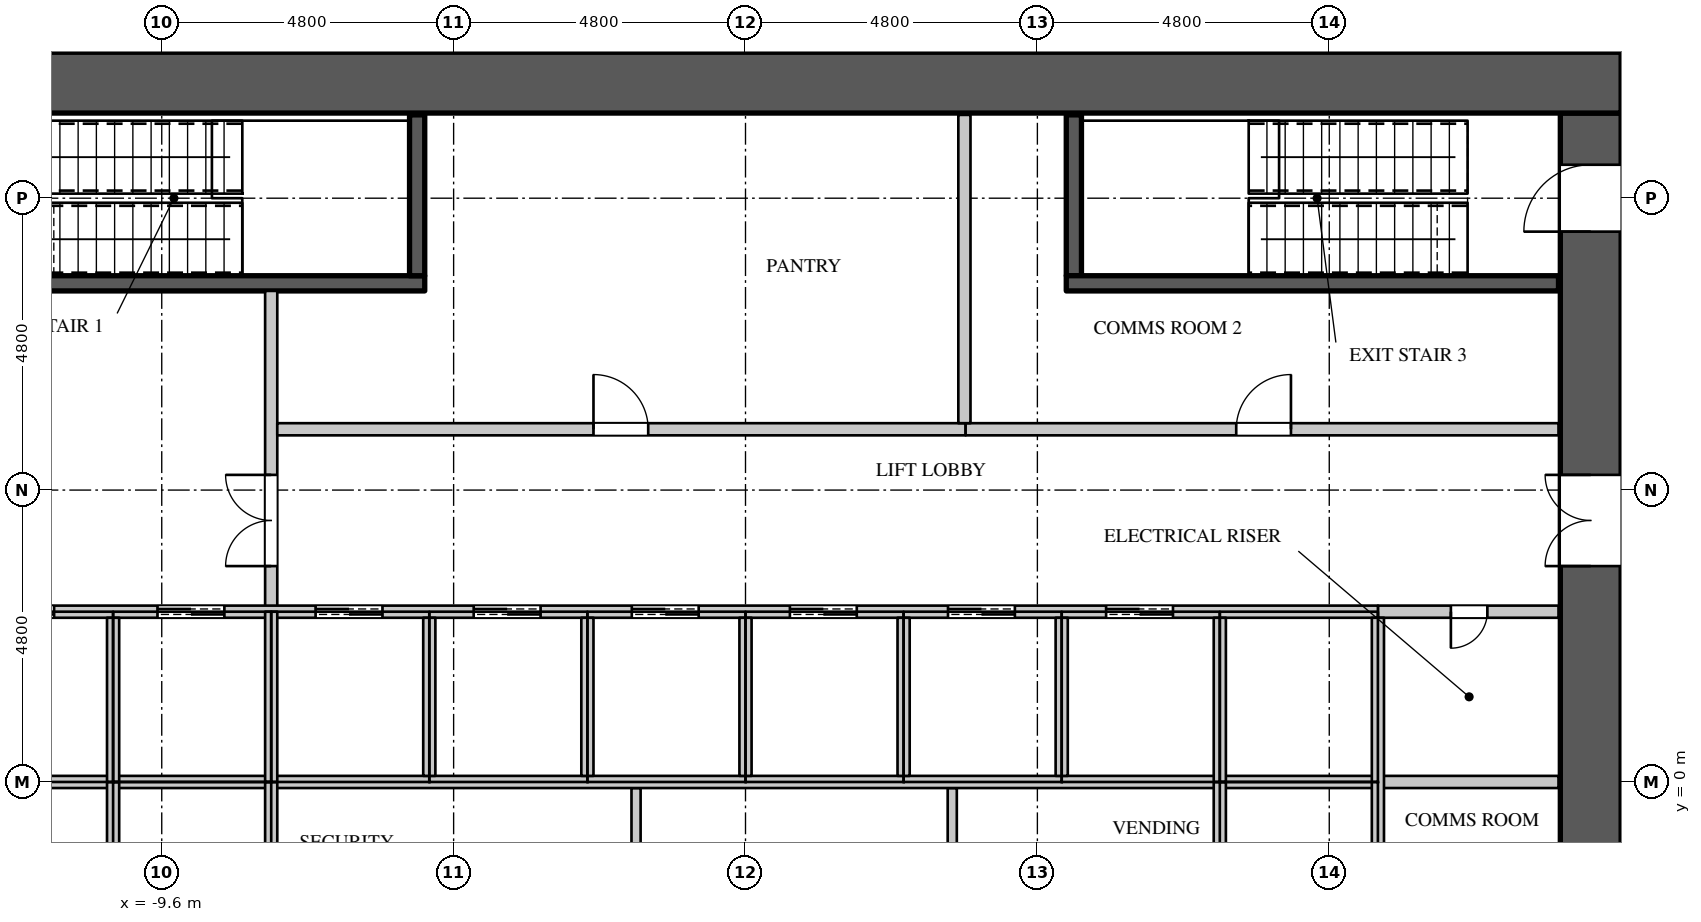
"""IFC4 building model, lengths in metres.
Left out: names, types, materials, properties, quantities, classifications, styles, units other than length and angle.
Written with IfcOpenShell. Run it as: python <this file> out.ifc"""

import sys

from ifc_helpers import new_model, si_unit, direction, frame, frame_2d, origin, place, context, subcontext, project, spatial, rectangle, extrude, element, fill, save


model = new_model("IFC4")
c1 = context("Model", 3, precision=1e-05, world=origin(), true_north=direction((0.0, 1.0)))
c2 = subcontext(c1, "Body", "Model", "MODEL_VIEW")
j1 = project(units=[si_unit("LENGTHUNIT", "METRE"), si_unit("PLANEANGLEUNIT", "RADIAN")], contexts=[c1])
p1 = place(None, origin())
s1 = spatial("IfcSite", under=j1, at=p1, CompositionType="ELEMENT")
p2 = place(p1, origin())
s2 = spatial("IfcBuilding", under=s1, at=p2, CompositionType="ELEMENT")
p3 = place(p2, frame((0.0, 0.0, 50.7)))
s3 = spatial("IfcBuildingStorey", under=s2, at=p3, CompositionType="ELEMENT", Elevation=50.7)
p4 = place(p3, frame((-14.4, 11.5, 0.0), z_axis=(0.0, 0.0, 1.0), x_axis=(1.0, 0.0, 0.0)))
e1 = element("IfcWall", 1, at=p4, inside=s3, PredefinedType="SHEAR", context=c2, shape_type="SweptSolid", body=[
    extrude(rectangle(XDim=28.8, YDim=1.0, at=frame_2d((14.4, 0.0))), origin(), (0.0, 0.0, 1.0), 4.2),
])
p5 = place(p3, frame((13.9, -11.0, 0.0), z_axis=(0.0, 0.0, 1.0), x_axis=(0.0, 1.0, 0.0)))
e2 = element("IfcWall", 2, at=p5, inside=s3, PredefinedType="SHEAR", context=c2, shape_type="SweptSolid", body=[
    extrude(rectangle(XDim=22.0, YDim=1.0, at=frame_2d((11.0, 0.0))), origin(), (0.0, 0.0, 1.0), 4.2),
])
p6 = place(p5, frame((20.05, 0.0, 0.0)))
e3 = element("IfcOpeningElement", 3, at=p6, cuts=e2, PredefinedType="OPENING", context=c2, shape_type="SweptSolid", body=[
    extrude(rectangle(XDim=1.1, YDim=2.2, at=frame_2d((0.55, 1.1))), frame((0.0, 0.51, 0.0), z_axis=(0.0, -1.0, 0.0), x_axis=(1.0, 0.0, 0.0)), (0.0, 0.0, 1.0), 1.02),
])
p7 = place(p5, frame((0.85, 0.0, 0.0)))
e4 = element("IfcOpeningElement", 4, at=p7, cuts=e2, PredefinedType="OPENING", context=c2, shape_type="SweptSolid", body=[
    extrude(rectangle(XDim=1.1, YDim=2.2, at=frame_2d((0.55, 1.1))), frame((0.0, 0.51, 0.0), z_axis=(0.0, -1.0, 0.0), x_axis=(1.0, 0.0, 0.0)), (0.0, 0.0, 1.0), 1.02),
])
p8 = place(p5, frame((14.55, 0.0, 0.0)))
e5 = element("IfcOpeningElement", 5, at=p8, cuts=e2, PredefinedType="OPENING", context=c2, shape_type="SweptSolid", body=[
    extrude(rectangle(XDim=1.5, YDim=2.4, at=frame_2d((0.75, 1.2))), frame((0.0, 0.51, 0.0), z_axis=(0.0, -1.0, 0.0), x_axis=(1.0, 0.0, 0.0)), (0.0, 0.0, 1.0), 1.02),
])
p9 = place(p5, frame((5.95, 0.0, 0.0)))
e6 = element("IfcOpeningElement", 6, at=p9, cuts=e2, PredefinedType="OPENING", context=c2, shape_type="SweptSolid", body=[
    extrude(rectangle(XDim=1.5, YDim=2.4, at=frame_2d((0.75, 1.2))), frame((0.0, 0.51, 0.0), z_axis=(0.0, -1.0, 0.0), x_axis=(1.0, 0.0, 0.0)), (0.0, 0.0, 1.0), 1.02),
])
p10 = place(p3, frame((-7.8, 2.8, 0.0), z_axis=(0.0, 0.0, 1.0), x_axis=(0.0, 1.0, 0.0)))
e7 = element("IfcWall", 7, at=p10, inside=s3, PredefinedType="PARTITIONING", context=c2, shape_type="SweptSolid", body=[
    extrude(rectangle(XDim=5.275, YDim=0.2, at=frame_2d((2.637, 0.0))), origin(), (0.0, 0.0, 1.0), 3.95),
])
p11 = place(p10, frame((0.75, 0.0, 0.0)))
e8 = element("IfcOpeningElement", 8, at=p11, cuts=e7, PredefinedType="OPENING", context=c2, shape_type="SweptSolid", body=[
    extrude(rectangle(XDim=1.5, YDim=2.4, at=frame_2d((0.75, 1.2))), frame((0.0, 0.11, 0.0), z_axis=(0.0, -1.0, 0.0), x_axis=(1.0, 0.0, 0.0)), (0.0, 0.0, 1.0), 0.22),
])
p12 = place(p3, frame((-7.7, 5.8, 0.0), z_axis=(0.0, 0.0, 1.0), x_axis=(1.0, 0.0, 0.0)))
e9 = element("IfcWall", 9, at=p12, inside=s3, PredefinedType="PARTITIONING", context=c2, shape_type="SweptSolid", body=[
    extrude(rectangle(XDim=11.32, YDim=0.2, at=frame_2d((5.66, 0.0))), origin(), (0.0, 0.0, 1.0), 3.95),
])
p13 = place(p12, frame((5.2, 0.0, 0.0)))
e10 = element("IfcOpeningElement", 10, at=p13, cuts=e9, PredefinedType="OPENING", context=c2, shape_type="SweptSolid", body=[
    extrude(rectangle(XDim=0.9, YDim=2.2, at=frame_2d((0.45, 1.1))), frame((0.0, 0.11, 0.0), z_axis=(0.0, -1.0, 0.0), x_axis=(1.0, 0.0, 0.0)), (0.0, 0.0, 1.0), 0.22),
])
for number, where, z_axis, x_axis in (
    (11, (-1.8, -2.7, 0.0), (0.0, 0.0, 1.0), (0.0, 1.0, 0.0)),
    (12, (3.4, -2.7, 0.0), (0.0, 0.0, 1.0), (0.0, 1.0, 0.0)),
):
    element("IfcWall", number, at=place(p3, frame(where, z_axis=z_axis, x_axis=x_axis)), inside=s3, PredefinedType="PARTITIONING", context=c2, shape_type="SweptSolid", body=[
        extrude(rectangle(XDim=2.6, YDim=0.15, at=frame_2d((1.3, 0.0))), origin(), (0.0, 0.0, 1.0), 3.95),
    ])
p14 = place(p3, frame((3.62, 5.8, 0.0), z_axis=(0.0, 0.0, 1.0), x_axis=(1.0, 0.0, 0.0)))
e13 = element("IfcWall", 13, at=p14, inside=s3, PredefinedType="PARTITIONING", context=c2, shape_type="SweptSolid", body=[
    extrude(rectangle(XDim=9.75, YDim=0.2, at=frame_2d((4.875, 0.0))), origin(), (0.0, 0.0, 1.0), 3.95),
])
p15 = place(p14, frame((4.45, 0.0, 0.0)))
e14 = element("IfcOpeningElement", 14, at=p15, cuts=e13, PredefinedType="OPENING", context=c2, shape_type="SweptSolid", body=[
    extrude(rectangle(XDim=0.9, YDim=2.2, at=frame_2d((0.45, 1.1))), frame((0.0, 0.11, 0.0), z_axis=(0.0, -1.0, 0.0), x_axis=(1.0, 0.0, 0.0)), (0.0, 0.0, 1.0), 0.22),
])
p16 = place(p3, frame((3.6, 5.9, 0.0), z_axis=(0.0, 0.0, 1.0), x_axis=(0.0, 1.0, 0.0)))
e15 = element("IfcWall", 15, at=p16, inside=s3, PredefinedType="PARTITIONING", context=c2, shape_type="SweptSolid", body=[
    extrude(rectangle(XDim=5.07, YDim=0.2, at=frame_2d((2.535, 0.0))), origin(), (0.0, 0.0, 1.0), 3.95),
])
p17 = place(p3, frame((10.4, 2.8, 0.0), z_axis=(0.0, 0.0, 1.0), x_axis=(1.0, 0.0, 0.0)))
e16 = element("IfcWall", 16, at=p17, inside=s3, PredefinedType="PARTITIONING", context=c2, shape_type="SweptSolid", body=[
    extrude(rectangle(XDim=2.97, YDim=0.2, at=frame_2d((1.485, 0.0))), origin(), (0.0, 0.0, 1.0), 3.95),
])
p18 = place(p17, frame((1.2, 0.0, 0.0)))
e17 = element("IfcOpeningElement", 17, at=p18, cuts=e16, PredefinedType="OPENING", context=c2, shape_type="SweptSolid", body=[
    extrude(rectangle(XDim=0.6, YDim=2.0, at=frame_2d((0.3, 1.0))), frame((0.0, 0.11, 0.0), z_axis=(0.0, -1.0, 0.0), x_axis=(1.0, 0.0, 0.0)), (0.0, 0.0, 1.0), 0.22),
])
p19 = place(p3, frame((10.4, 0.0, 0.0), z_axis=(0.0, 0.0, 1.0), x_axis=(1.0, 0.0, 0.0)))
e18 = element("IfcWall", 18, at=p19, inside=s3, PredefinedType="PARTITIONING", context=c2, shape_type="SweptSolid", body=[
    extrude(rectangle(XDim=2.97, YDim=0.2, at=frame_2d((1.485, 0.0))), origin(), (0.0, 0.0, 1.0), 3.95),
])
p20 = place(p3, frame((-13.37, 0.0, 0.0), z_axis=(0.0, 0.0, 1.0), x_axis=(1.0, 0.0, 0.0)))
e19 = element("IfcWall", 19, at=p20, inside=s3, PredefinedType="PARTITIONING", context=c2, shape_type="SweptSolid", body=[
    extrude(rectangle(XDim=23.77, YDim=0.2, at=frame_2d((11.885, 0.0))), origin(), (0.0, 0.0, 1.0), 3.95),
])
p21 = place(p3, frame((-13.37, 2.8, 0.0), z_axis=(0.0, 0.0, 1.0), x_axis=(1.0, 0.0, 0.0)))
e20 = element("IfcWall", 20, at=p21, inside=s3, PredefinedType="PARTITIONING", context=c2, shape_type="SweptSolid", body=[
    extrude(rectangle(XDim=23.77, YDim=0.2, at=frame_2d((11.885, 0.0))), origin(), (0.0, 0.0, 1.0), 3.95),
])
p22 = place(p21, frame((0.9, 0.0, 0.0)))
e21 = element("IfcOpeningElement", 21, at=p22, cuts=e20, PredefinedType="OPENING", context=c2, shape_type="SweptSolid", body=[
    extrude(rectangle(XDim=1.1, YDim=2.2, at=frame_2d((0.55, 1.1))), frame((0.0, 0.11, 0.0), z_axis=(0.0, -1.0, 0.0), x_axis=(1.0, 0.0, 0.0)), (0.0, 0.0, 1.0), 0.22),
])
p23 = place(p21, frame((3.7, 0.0, 0.0)))
e22 = element("IfcOpeningElement", 22, at=p23, cuts=e20, PredefinedType="OPENING", context=c2, shape_type="SweptSolid", body=[
    extrude(rectangle(XDim=1.1, YDim=2.2, at=frame_2d((0.55, 1.1))), frame((0.0, 0.11, 0.0), z_axis=(0.0, -1.0, 0.0), x_axis=(1.0, 0.0, 0.0)), (0.0, 0.0, 1.0), 0.22),
])
p24 = place(p21, frame((6.3, 0.0, 0.0)))
e23 = element("IfcOpeningElement", 23, at=p24, cuts=e20, PredefinedType="OPENING", context=c2, shape_type="SweptSolid", body=[
    extrude(rectangle(XDim=1.1, YDim=2.2, at=frame_2d((0.55, 1.1))), frame((0.0, 0.11, 0.0), z_axis=(0.0, -1.0, 0.0), x_axis=(1.0, 0.0, 0.0)), (0.0, 0.0, 1.0), 0.22),
])
p25 = place(p21, frame((8.9, 0.0, 0.0)))
e24 = element("IfcOpeningElement", 24, at=p25, cuts=e20, PredefinedType="OPENING", context=c2, shape_type="SweptSolid", body=[
    extrude(rectangle(XDim=1.1, YDim=2.2, at=frame_2d((0.55, 1.1))), frame((0.0, 0.11, 0.0), z_axis=(0.0, -1.0, 0.0), x_axis=(1.0, 0.0, 0.0)), (0.0, 0.0, 1.0), 0.22),
])
p26 = place(p21, frame((11.5, 0.0, 0.0)))
e25 = element("IfcOpeningElement", 25, at=p26, cuts=e20, PredefinedType="OPENING", context=c2, shape_type="SweptSolid", body=[
    extrude(rectangle(XDim=1.1, YDim=2.2, at=frame_2d((0.55, 1.1))), frame((0.0, 0.11, 0.0), z_axis=(0.0, -1.0, 0.0), x_axis=(1.0, 0.0, 0.0)), (0.0, 0.0, 1.0), 0.22),
])
p27 = place(p21, frame((14.1, 0.0, 0.0)))
e26 = element("IfcOpeningElement", 26, at=p27, cuts=e20, PredefinedType="OPENING", context=c2, shape_type="SweptSolid", body=[
    extrude(rectangle(XDim=1.1, YDim=2.2, at=frame_2d((0.55, 1.1))), frame((0.0, 0.11, 0.0), z_axis=(0.0, -1.0, 0.0), x_axis=(1.0, 0.0, 0.0)), (0.0, 0.0, 1.0), 0.22),
])
p28 = place(p21, frame((16.7, 0.0, 0.0)))
e27 = element("IfcOpeningElement", 27, at=p28, cuts=e20, PredefinedType="OPENING", context=c2, shape_type="SweptSolid", body=[
    extrude(rectangle(XDim=1.1, YDim=2.2, at=frame_2d((0.55, 1.1))), frame((0.0, 0.11, 0.0), z_axis=(0.0, -1.0, 0.0), x_axis=(1.0, 0.0, 0.0)), (0.0, 0.0, 1.0), 0.22),
])
p29 = place(p21, frame((19.3, 0.0, 0.0)))
e28 = element("IfcOpeningElement", 28, at=p29, cuts=e20, PredefinedType="OPENING", context=c2, shape_type="SweptSolid", body=[
    extrude(rectangle(XDim=1.1, YDim=2.2, at=frame_2d((0.55, 1.1))), frame((0.0, 0.11, 0.0), z_axis=(0.0, -1.0, 0.0), x_axis=(1.0, 0.0, 0.0)), (0.0, 0.0, 1.0), 0.22),
])
for number, where, z_axis, x_axis in (
    (29, (-10.4, -2.7, 0.0), (0.0, 0.0, 1.0), (0.0, 1.0, 0.0)),
    (30, (-10.4, 0.0, 0.0), (0.0, 0.0, 1.0), (0.0, 1.0, 0.0)),
):
    element("IfcWall", number, at=place(p3, frame(where, z_axis=z_axis, x_axis=x_axis)), inside=s3, PredefinedType="PARTITIONING", context=c2, shape_type="SweptSolid", body=[
        extrude(rectangle(XDim=2.7, YDim=0.2, at=frame_2d((1.35, 0.0))), origin(), (0.0, 0.0, 1.0), 3.95),
    ])
for number, where, z_axis, x_axis in (
    (31, (-7.8, -2.8, 0.0), (0.0, 0.0, 1.0), (0.0, 1.0, 0.0)),
    (32, (-7.8, 0.0, 0.0), (0.0, 0.0, 1.0), (0.0, 1.0, 0.0)),
):
    element("IfcWall", number, at=place(p3, frame(where, z_axis=z_axis, x_axis=x_axis)), inside=s3, PredefinedType="PARTITIONING", context=c2, shape_type="SweptSolid", body=[
        extrude(rectangle(XDim=2.8, YDim=0.2, at=frame_2d((1.4, 0.0))), origin(), (0.0, 0.0, 1.0), 3.95),
    ])
for number, where, z_axis, x_axis in (
    (33, (-5.2, 0.1, 0.0), (0.0, 0.0, 1.0), (0.0, 1.0, 0.0)),
    (34, (-2.6, 0.1, 0.0), (0.0, 0.0, 1.0), (0.0, 1.0, 0.0)),
    (35, (0.0, 0.1, 0.0), (0.0, 0.0, 1.0), (0.0, 1.0, 0.0)),
    (36, (2.6, 0.1, 0.0), (0.0, 0.0, 1.0), (0.0, 1.0, 0.0)),
    (37, (5.2, 0.1, 0.0), (0.0, 0.0, 1.0), (0.0, 1.0, 0.0)),
):
    element("IfcWall", number, at=place(p3, frame(where, z_axis=z_axis, x_axis=x_axis)), inside=s3, PredefinedType="PARTITIONING", context=c2, shape_type="SweptSolid", body=[
        extrude(rectangle(XDim=2.6, YDim=0.2, at=frame_2d((1.3, 0.0))), origin(), (0.0, 0.0, 1.0), 3.95),
    ])
for number, where, z_axis, x_axis in (
    (38, (7.8, -2.7, 0.0), (0.0, 0.0, 1.0), (0.0, 1.0, 0.0)),
    (39, (7.8, 0.0, 0.0), (0.0, 0.0, 1.0), (0.0, 1.0, 0.0)),
):
    element("IfcWall", number, at=place(p3, frame(where, z_axis=z_axis, x_axis=x_axis)), inside=s3, PredefinedType="PARTITIONING", context=c2, shape_type="SweptSolid", body=[
        extrude(rectangle(XDim=2.7, YDim=0.2, at=frame_2d((1.35, 0.0))), origin(), (0.0, 0.0, 1.0), 3.95),
    ])
p30 = place(p3, frame((10.4, -2.7, 0.0), z_axis=(0.0, 0.0, 1.0), x_axis=(0.0, 1.0, 0.0)))
e40 = element("IfcWall", 40, at=p30, inside=s3, PredefinedType="PARTITIONING", context=c2, shape_type="SweptSolid", body=[
    extrude(rectangle(XDim=5.4, YDim=0.2, at=frame_2d((2.7, 0.0))), origin(), (0.0, 0.0, 1.0), 3.95),
])
p31 = place(p3, frame((-13.37, 8.2, 0.0), z_axis=(0.0, 0.0, 1.0), x_axis=(1.0, 0.0, 0.0)))
e41 = element("IfcWall", 41, at=p31, inside=s3, PredefinedType="SHEAR", context=c2, shape_type="SweptSolid", body=[
    extrude(rectangle(XDim=8.095, YDim=0.25, at=frame_2d((4.048, 0.0))), origin(), (0.0, 0.0, 1.0), 3.95),
])
p32 = place(p31, frame((0.15, 0.0, 0.0)))
e42 = element("IfcOpeningElement", 42, at=p32, cuts=e41, PredefinedType="OPENING", context=c2, shape_type="SweptSolid", body=[
    extrude(rectangle(XDim=1.1, YDim=2.2, at=frame_2d((0.55, 1.1))), frame((0.0, 0.135, 0.0), z_axis=(0.0, -1.0, 0.0), x_axis=(1.0, 0.0, 0.0)), (0.0, 0.0, 1.0), 0.27),
])
for number, where, z_axis, x_axis in (
    (43, (-5.4, 8.325, 0.0), (0.0, 0.0, 1.0), (0.0, 1.0, 0.0)),
    (44, (5.4, 8.325, 0.0), (0.0, 0.0, 1.0), (0.0, 1.0, 0.0)),
):
    element("IfcWall", number, at=place(p3, frame(where, z_axis=z_axis, x_axis=x_axis)), inside=s3, PredefinedType="SHEAR", context=c2, shape_type="SweptSolid", body=[
        extrude(rectangle(XDim=2.645, YDim=0.25, at=frame_2d((1.323, 0.0))), origin(), (0.0, 0.0, 1.0), 3.95),
    ])
p33 = place(p3, frame((5.275, 8.2, 0.0), z_axis=(0.0, 0.0, 1.0), x_axis=(1.0, 0.0, 0.0)))
e45 = element("IfcWall", 45, at=p33, inside=s3, PredefinedType="SHEAR", context=c2, shape_type="SweptSolid", body=[
    extrude(rectangle(XDim=8.095, YDim=0.25, at=frame_2d((4.048, 0.0))), origin(), (0.0, 0.0, 1.0), 3.95),
])
p34 = place(p18, origin())
e46 = element("IfcDoor", 46, at=p34, inside=s3, OperationType="SINGLE_SWING_RIGHT", PredefinedType="DOOR", context=c2, shape_type="SweptSolid", body=[
    extrude(rectangle(XDim=0.6, YDim=2.0, at=frame_2d((0.3, 1.0))), frame((0.0, 0.025, 0.0), z_axis=(0.0, -1.0, 0.0), x_axis=(1.0, 0.0, 0.0)), (0.0, 0.0, 1.0), 0.05),
])
fill(e17, e46)
p35 = place(p13, origin())
e47 = element("IfcDoor", 47, at=p35, inside=s3, OperationType="SINGLE_SWING_LEFT", PredefinedType="DOOR", context=c2, shape_type="SweptSolid", body=[
    extrude(rectangle(XDim=0.9, YDim=2.2, at=frame_2d((0.45, 1.1))), frame((0.0, 0.025, 0.0), z_axis=(0.0, -1.0, 0.0), x_axis=(1.0, 0.0, 0.0)), (0.0, 0.0, 1.0), 0.05),
])
fill(e10, e47)
p36 = place(p15, origin())
e48 = element("IfcDoor", 48, at=p36, inside=s3, OperationType="SINGLE_SWING_RIGHT", PredefinedType="DOOR", context=c2, shape_type="SweptSolid", body=[
    extrude(rectangle(XDim=0.9, YDim=2.2, at=frame_2d((0.45, 1.1))), frame((0.0, 0.025, 0.0), z_axis=(0.0, -1.0, 0.0), x_axis=(1.0, 0.0, 0.0)), (0.0, 0.0, 1.0), 0.05),
])
fill(e14, e48)
p37 = place(p22, origin())
e49 = element("IfcDoor", 49, at=p37, inside=s3, OperationType="DOUBLE_DOOR_SLIDING", PredefinedType="DOOR", context=c2, shape_type="SweptSolid", body=[
    extrude(rectangle(XDim=1.1, YDim=2.2, at=frame_2d((0.55, 1.1))), frame((0.0, 0.025, 0.0), z_axis=(0.0, -1.0, 0.0), x_axis=(1.0, 0.0, 0.0)), (0.0, 0.0, 1.0), 0.05),
])
fill(e21, e49)
p38 = place(p23, origin())
e50 = element("IfcDoor", 50, at=p38, inside=s3, OperationType="DOUBLE_DOOR_SLIDING", PredefinedType="DOOR", context=c2, shape_type="SweptSolid", body=[
    extrude(rectangle(XDim=1.1, YDim=2.2, at=frame_2d((0.55, 1.1))), frame((0.0, 0.025, 0.0), z_axis=(0.0, -1.0, 0.0), x_axis=(1.0, 0.0, 0.0)), (0.0, 0.0, 1.0), 0.05),
])
fill(e22, e50)
p39 = place(p24, origin())
e51 = element("IfcDoor", 51, at=p39, inside=s3, OperationType="DOUBLE_DOOR_SLIDING", PredefinedType="DOOR", context=c2, shape_type="SweptSolid", body=[
    extrude(rectangle(XDim=1.1, YDim=2.2, at=frame_2d((0.55, 1.1))), frame((0.0, 0.025, 0.0), z_axis=(0.0, -1.0, 0.0), x_axis=(1.0, 0.0, 0.0)), (0.0, 0.0, 1.0), 0.05),
])
fill(e23, e51)
p40 = place(p25, origin())
e52 = element("IfcDoor", 52, at=p40, inside=s3, OperationType="DOUBLE_DOOR_SLIDING", PredefinedType="DOOR", context=c2, shape_type="SweptSolid", body=[
    extrude(rectangle(XDim=1.1, YDim=2.2, at=frame_2d((0.55, 1.1))), frame((0.0, 0.025, 0.0), z_axis=(0.0, -1.0, 0.0), x_axis=(1.0, 0.0, 0.0)), (0.0, 0.0, 1.0), 0.05),
])
fill(e24, e52)
p41 = place(p26, origin())
e53 = element("IfcDoor", 53, at=p41, inside=s3, OperationType="DOUBLE_DOOR_SLIDING", PredefinedType="DOOR", context=c2, shape_type="SweptSolid", body=[
    extrude(rectangle(XDim=1.1, YDim=2.2, at=frame_2d((0.55, 1.1))), frame((0.0, 0.025, 0.0), z_axis=(0.0, -1.0, 0.0), x_axis=(1.0, 0.0, 0.0)), (0.0, 0.0, 1.0), 0.05),
])
fill(e25, e53)
p42 = place(p27, origin())
e54 = element("IfcDoor", 54, at=p42, inside=s3, OperationType="DOUBLE_DOOR_SLIDING", PredefinedType="DOOR", context=c2, shape_type="SweptSolid", body=[
    extrude(rectangle(XDim=1.1, YDim=2.2, at=frame_2d((0.55, 1.1))), frame((0.0, 0.025, 0.0), z_axis=(0.0, -1.0, 0.0), x_axis=(1.0, 0.0, 0.0)), (0.0, 0.0, 1.0), 0.05),
])
fill(e26, e54)
p43 = place(p28, origin())
e55 = element("IfcDoor", 55, at=p43, inside=s3, OperationType="DOUBLE_DOOR_SLIDING", PredefinedType="DOOR", context=c2, shape_type="SweptSolid", body=[
    extrude(rectangle(XDim=1.1, YDim=2.2, at=frame_2d((0.55, 1.1))), frame((0.0, 0.025, 0.0), z_axis=(0.0, -1.0, 0.0), x_axis=(1.0, 0.0, 0.0)), (0.0, 0.0, 1.0), 0.05),
])
fill(e27, e55)
p44 = place(p29, origin())
e56 = element("IfcDoor", 56, at=p44, inside=s3, OperationType="DOUBLE_DOOR_SLIDING", PredefinedType="DOOR", context=c2, shape_type="SweptSolid", body=[
    extrude(rectangle(XDim=1.1, YDim=2.2, at=frame_2d((0.55, 1.1))), frame((0.0, 0.025, 0.0), z_axis=(0.0, -1.0, 0.0), x_axis=(1.0, 0.0, 0.0)), (0.0, 0.0, 1.0), 0.05),
])
fill(e28, e56)
p45 = place(p11, origin())
e57 = element("IfcDoor", 57, at=p45, inside=s3, OperationType="DOUBLE_DOOR_SINGLE_SWING", PredefinedType="DOOR", context=c2, shape_type="SweptSolid", body=[
    extrude(rectangle(XDim=1.5, YDim=2.4, at=frame_2d((0.75, 1.2))), frame((0.0, 0.025, 0.0), z_axis=(0.0, -1.0, 0.0), x_axis=(1.0, 0.0, 0.0)), (0.0, 0.0, 1.0), 0.05),
])
fill(e8, e57)
p46 = place(p6, origin())
e58 = element("IfcDoor", 58, at=p46, inside=s3, OperationType="SINGLE_SWING_LEFT", PredefinedType="DOOR", context=c2, shape_type="SweptSolid", body=[
    extrude(rectangle(XDim=1.1, YDim=2.2, at=frame_2d((0.55, 1.1))), frame((0.0, 0.495, 0.0), z_axis=(0.0, -1.0, 0.0), x_axis=(1.0, 0.0, 0.0)), (0.0, 0.0, 1.0), 0.05),
])
fill(e3, e58)
p47 = place(p8, origin())
e59 = element("IfcDoor", 59, at=p47, inside=s3, OperationType="DOUBLE_DOOR_SINGLE_SWING", PredefinedType="DOOR", context=c2, shape_type="SweptSolid", body=[
    extrude(rectangle(XDim=1.5, YDim=2.4, at=frame_2d((0.75, 1.2))), frame((0.0, 0.495, 0.0), z_axis=(0.0, -1.0, 0.0), x_axis=(1.0, 0.0, 0.0)), (0.0, 0.0, 1.0), 0.05),
])
fill(e5, e59)
save(model, sys.argv[1])
